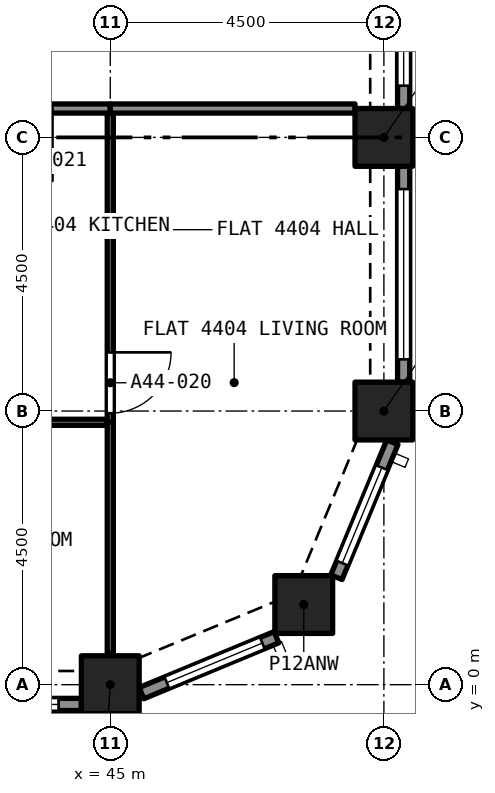
"""IFC4 building model, lengths in metres.
Left out: names, types, materials, properties, quantities, classifications, styles, units other than length and angle.
Written with IfcOpenShell. Run it as: python <this file> out.ifc"""

import sys

from ifc_helpers import new_model, si_unit, direction, frame, frame_2d, origin, origin_2d, place, context, subcontext, project, spatial, rectangle, extrude, element, fill, save


model = new_model("IFC4")
c1 = context("Model", 3, precision=1e-05, world=origin(), true_north=direction((0.0, 1.0)))
c2 = subcontext(c1, "Body", "Model", "MODEL_VIEW")
j1 = project(units=[si_unit("LENGTHUNIT", "METRE"), si_unit("PLANEANGLEUNIT", "RADIAN")], contexts=[c1])
p1 = place(None, origin())
s1 = spatial("IfcSite", under=j1, at=p1, CompositionType="ELEMENT")
p2 = place(p1, origin())
s2 = spatial("IfcBuilding", under=s1, at=p2, CompositionType="ELEMENT")
p3 = place(p2, frame((0.0, 0.0, 159.4)))
s3 = spatial("IfcBuildingStorey", under=s2, at=p3, CompositionType="ELEMENT", Elevation=159.4)
for number, where, z_axis, x_axis in (
    (1, (45.0, 0.0, 0.0), (0.0, 0.0, 1.0), (1.0, 0.0, 0.0)),
    (2, (48.182, 1.318, 0.0), (0.0, 0.0, 1.0), (1.0, 0.0, 0.0)),
    (3, (49.5, 4.5, 0.0), (0.0, 0.0, 1.0), (1.0, 0.0, 0.0)),
    (4, (49.5, 9.0, 0.0), (0.0, 0.0, 1.0), (1.0, 0.0, 0.0)),
):
    element("IfcColumn", number, at=place(p3, frame(where, z_axis=z_axis, x_axis=x_axis)), inside=s3, PredefinedType="COLUMN", context=c2, shape_type="SweptSolid", body=[
        extrude(rectangle(XDim=0.95, YDim=0.95, at=origin_2d()), origin(), (0.0, 0.0, 1.0), 4.4),
    ])
p4 = place(p3, frame((44.525, -0.325, 0.0), z_axis=(0.0, 0.0, 1.0), x_axis=(-1.0, 0.0, 0.0)))
e5 = element("IfcWall", 5, at=p4, inside=s3, PredefinedType="SOLIDWALL", context=c2, shape_type="SweptSolid", body=[
    extrude(rectangle(XDim=3.55, YDim=0.2, at=frame_2d((1.775, 0.0))), origin(), (0.0, 0.0, 1.0), 4.4),
])
p5 = place(p4, frame((0.375, 0.0, 0.45)))
e6 = element("IfcOpeningElement", 6, at=p5, cuts=e5, PredefinedType="OPENING", context=c2, shape_type="SweptSolid", body=[
    extrude(rectangle(XDim=2.8, YDim=2.55, at=frame_2d((1.4, 1.275))), frame((0.0, 0.11, 0.0), z_axis=(0.0, -1.0, 0.0), x_axis=(1.0, 0.0, 0.0)), (0.0, 0.0, 1.0), 0.22),
])
p6 = place(p3, frame((47.733, 0.78, 0.0), z_axis=(0.0, 0.0, 1.0), x_axis=(-0.923880599843, -0.382680855588, 0.0)))
e7 = element("IfcWall", 7, at=p6, inside=s3, PredefinedType="SOLIDWALL", context=c2, shape_type="SweptSolid", body=[
    extrude(rectangle(XDim=2.403, YDim=0.2, at=frame_2d((1.201, 0.0))), origin(), (0.0, 0.0, 1.0), 4.4),
])
p7 = place(p6, frame((0.251, 0.0, 0.45)))
e8 = element("IfcOpeningElement", 8, at=p7, cuts=e7, PredefinedType="OPENING", context=c2, shape_type="SweptSolid", body=[
    extrude(rectangle(XDim=1.7, YDim=2.55, at=frame_2d((0.85, 1.275))), frame((0.0, 0.11, 0.0), z_axis=(0.0, -1.0, 0.0), x_axis=(1.0, 0.0, 0.0)), (0.0, 0.0, 1.0), 0.22),
])
p8 = place(p3, frame((49.639, 3.987, 0.0), z_axis=(0.0, 0.0, 1.0), x_axis=(-0.382680855588, -0.923880599843, 0.0)))
e9 = element("IfcWall", 9, at=p8, inside=s3, PredefinedType="SOLIDWALL", context=c2, shape_type="SweptSolid", body=[
    extrude(rectangle(XDim=2.403, YDim=0.2, at=frame_2d((1.201, 0.0))), origin(), (0.0, 0.0, 1.0), 4.4),
])
p9 = place(p8, frame((0.451, 0.0, 0.45)))
e10 = element("IfcOpeningElement", 10, at=p9, cuts=e9, PredefinedType="OPENING", context=c2, shape_type="SweptSolid", body=[
    extrude(rectangle(XDim=1.7, YDim=2.55, at=frame_2d((0.85, 1.275))), frame((0.0, 0.11, 0.0), z_axis=(0.0, -1.0, 0.0), x_axis=(1.0, 0.0, 0.0)), (0.0, 0.0, 1.0), 0.22),
])
p10 = place(p3, frame((49.825, 8.525, 0.0), z_axis=(0.0, 0.0, 1.0), x_axis=(0.0, -1.0, 0.0)))
e11 = element("IfcWall", 11, at=p10, inside=s3, PredefinedType="SOLIDWALL", context=c2, shape_type="SweptSolid", body=[
    extrude(rectangle(XDim=3.55, YDim=0.2, at=frame_2d((1.775, 0.0))), origin(), (0.0, 0.0, 1.0), 4.4),
])
p11 = place(p10, frame((0.375, 0.0, 0.45)))
e12 = element("IfcOpeningElement", 12, at=p11, cuts=e11, PredefinedType="OPENING", context=c2, shape_type="SweptSolid", body=[
    extrude(rectangle(XDim=2.8, YDim=2.55, at=frame_2d((1.4, 1.275))), frame((0.0, 0.11, 0.0), z_axis=(0.0, -1.0, 0.0), x_axis=(1.0, 0.0, 0.0)), (0.0, 0.0, 1.0), 0.22),
])
p12 = place(p3, frame((49.825, 13.025, 0.0), z_axis=(0.0, 0.0, 1.0), x_axis=(0.0, -1.0, 0.0)))
e13 = element("IfcWall", 13, at=p12, inside=s3, PredefinedType="SOLIDWALL", context=c2, shape_type="SweptSolid", body=[
    extrude(rectangle(XDim=3.55, YDim=0.2, at=frame_2d((1.775, 0.0))), origin(), (0.0, 0.0, 1.0), 4.4),
])
p13 = place(p12, frame((0.375, 0.0, 0.45)))
e14 = element("IfcOpeningElement", 14, at=p13, cuts=e13, PredefinedType="OPENING", context=c2, shape_type="SweptSolid", body=[
    extrude(rectangle(XDim=2.8, YDim=2.55, at=frame_2d((1.4, 1.275))), frame((0.0, 0.11, 0.0), z_axis=(0.0, -1.0, 0.0), x_axis=(1.0, 0.0, 0.0)), (0.0, 0.0, 1.0), 0.22),
])
p14 = place(p3, frame((44.95, 4.315, 0.0), z_axis=(0.0, 0.0, 1.0), x_axis=(-1.0, 0.0, 0.0)))
e15 = element("IfcWall", 15, at=p14, inside=s3, PredefinedType="PARTITIONING", context=c2, shape_type="SweptSolid", body=[
    extrude(rectangle(XDim=4.35, YDim=0.1, at=frame_2d((2.175, 0.0))), origin(), (0.0, 0.0, 1.0), 4.1),
])
p15 = place(p14, frame((1.75, 0.0, 0.0)))
e16 = element("IfcOpeningElement", 16, at=p15, cuts=e15, PredefinedType="OPENING", context=c2, shape_type="SweptSolid", body=[
    extrude(rectangle(XDim=0.9, YDim=2.1, at=frame_2d((0.45, 1.05))), frame((0.0, 0.06, 0.0), z_axis=(0.0, -1.0, 0.0), x_axis=(1.0, 0.0, 0.0)), (0.0, 0.0, 1.0), 0.12),
])
p16 = place(p3, frame((45.0, 0.514, 0.0), z_axis=(0.0, 0.0, 1.0), x_axis=(0.0, 1.0, 0.0)))
e17 = element("IfcWall", 17, at=p16, inside=s3, PredefinedType="PARTITIONING", context=c2, shape_type="SweptSolid", body=[
    extrude(rectangle(XDim=3.801, YDim=0.1, at=frame_2d((1.9, 0.0))), origin(), (0.0, 0.0, 1.0), 4.1),
])
p17 = place(p3, frame((45.0, 9.4, 0.0), z_axis=(0.0, 0.0, 1.0), x_axis=(0.0, -1.0, 0.0)))
e18 = element("IfcWall", 18, at=p17, inside=s3, PredefinedType="PARTITIONING", context=c2, shape_type="SweptSolid", body=[
    extrude(rectangle(XDim=5.085, YDim=0.1, at=frame_2d((2.542, 0.0))), origin(), (0.0, 0.0, 1.0), 4.1),
])
p18 = place(p17, frame((3.935, 0.0, 0.0)))
e19 = element("IfcOpeningElement", 19, at=p18, cuts=e18, PredefinedType="OPENING", context=c2, shape_type="SweptSolid", body=[
    extrude(rectangle(XDim=1.0, YDim=2.1, at=frame_2d((0.5, 1.05))), frame((0.0, 0.06, 0.0), z_axis=(0.0, -1.0, 0.0), x_axis=(1.0, 0.0, 0.0)), (0.0, 0.0, 1.0), 0.12),
])
p19 = place(p3, frame((45.0, 9.475, 0.0), z_axis=(0.0, 0.0, 1.0), x_axis=(-1.0, 0.0, 0.0)))
e20 = element("IfcWall", 20, at=p19, inside=s3, PredefinedType="PARTITIONING", context=c2, shape_type="SweptSolid", body=[
    extrude(rectangle(XDim=2.35, YDim=0.15, at=frame_2d((1.175, 0.0))), origin(), (0.0, 0.0, 1.0), 4.1),
])
p20 = place(p19, frame((0.95, 0.0, 0.0)))
e21 = element("IfcOpeningElement", 21, at=p20, cuts=e20, PredefinedType="OPENING", context=c2, shape_type="SweptSolid", body=[
    extrude(rectangle(XDim=1.2, YDim=2.4, at=frame_2d((0.6, 1.2))), frame((0.0, 0.085, 0.0), z_axis=(0.0, -1.0, 0.0), x_axis=(1.0, 0.0, 0.0)), (0.0, 0.0, 1.0), 0.17),
])
p21 = place(p3, frame((45.0, 9.475, 0.0), z_axis=(0.0, 0.0, 1.0), x_axis=(1.0, 0.0, 0.0)))
e22 = element("IfcWall", 22, at=p21, inside=s3, PredefinedType="PARTITIONING", context=c2, shape_type="SweptSolid", body=[
    extrude(rectangle(XDim=4.025, YDim=0.15, at=frame_2d((2.012, 0.0))), origin(), (0.0, 0.0, 1.0), 4.1),
])
p22 = place(p5, origin())
e23 = element("IfcWindow", 23, at=p22, inside=s3, PartitioningType="SINGLE_PANEL", PredefinedType="WINDOW", context=c2, shape_type="SweptSolid", body=[
    extrude(rectangle(XDim=2.8, YDim=2.55, at=frame_2d((1.4, 1.275))), frame((0.0, 0.03, 0.0), z_axis=(0.0, -1.0, 0.0), x_axis=(1.0, 0.0, 0.0)), (0.0, 0.0, 1.0), 0.06),
])
fill(e6, e23)
p23 = place(p7, origin())
e24 = element("IfcWindow", 24, at=p23, inside=s3, PartitioningType="SINGLE_PANEL", PredefinedType="WINDOW", context=c2, shape_type="SweptSolid", body=[
    extrude(rectangle(XDim=1.7, YDim=2.55, at=frame_2d((0.85, 1.275))), frame((0.0, 0.03, 0.0), z_axis=(0.0, -1.0, 0.0), x_axis=(1.0, 0.0, 0.0)), (0.0, 0.0, 1.0), 0.06),
])
fill(e8, e24)
p24 = place(p9, origin())
e25 = element("IfcWindow", 25, at=p24, inside=s3, PartitioningType="SINGLE_PANEL", PredefinedType="WINDOW", context=c2, shape_type="SweptSolid", body=[
    extrude(rectangle(XDim=1.7, YDim=2.55, at=frame_2d((0.85, 1.275))), frame((0.0, 0.03, 0.0), z_axis=(0.0, -1.0, 0.0), x_axis=(1.0, 0.0, 0.0)), (0.0, 0.0, 1.0), 0.06),
])
fill(e10, e25)
p25 = place(p11, origin())
e26 = element("IfcWindow", 26, at=p25, inside=s3, PartitioningType="SINGLE_PANEL", PredefinedType="WINDOW", context=c2, shape_type="SweptSolid", body=[
    extrude(rectangle(XDim=2.8, YDim=2.55, at=frame_2d((1.4, 1.275))), frame((0.0, 0.03, 0.0), z_axis=(0.0, -1.0, 0.0), x_axis=(1.0, 0.0, 0.0)), (0.0, 0.0, 1.0), 0.06),
])
fill(e12, e26)
p26 = place(p13, origin())
e27 = element("IfcWindow", 27, at=p26, inside=s3, PartitioningType="SINGLE_PANEL", PredefinedType="WINDOW", context=c2, shape_type="SweptSolid", body=[
    extrude(rectangle(XDim=2.8, YDim=2.55, at=frame_2d((1.4, 1.275))), frame((0.0, 0.03, 0.0), z_axis=(0.0, -1.0, 0.0), x_axis=(1.0, 0.0, 0.0)), (0.0, 0.0, 1.0), 0.06),
])
fill(e14, e27)
p27 = place(p18, origin())
e28 = element("IfcDoor", 28, at=p27, inside=s3, OperationType="SINGLE_SWING_RIGHT", PredefinedType="DOOR", context=c2, shape_type="SweptSolid", body=[
    extrude(rectangle(XDim=1.0, YDim=2.1, at=frame_2d((0.5, 1.05))), frame((0.0, 0.025, 0.0), z_axis=(0.0, -1.0, 0.0), x_axis=(1.0, 0.0, 0.0)), (0.0, 0.0, 1.0), 0.05),
])
fill(e19, e28)
save(model, sys.argv[1])
